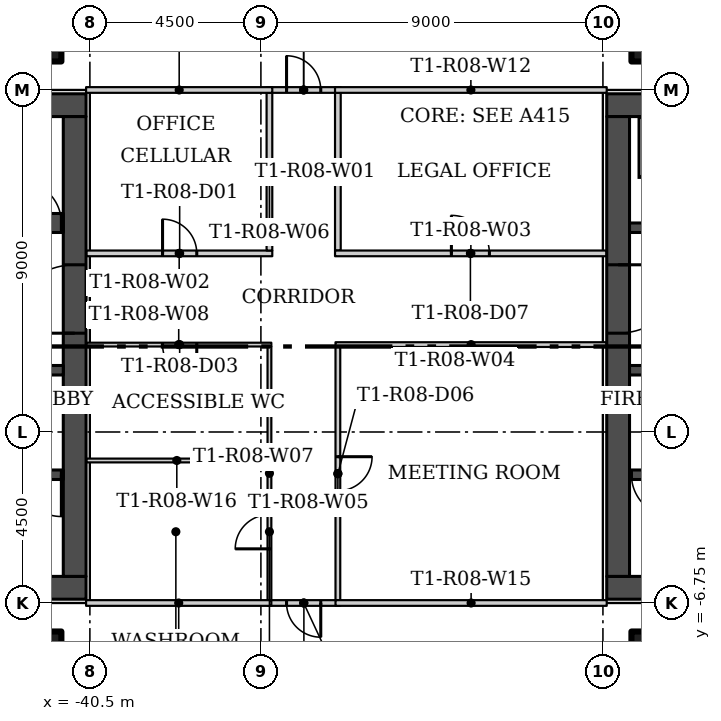
"""IFC4 building model, lengths in metres.
Left out: names, types, materials, properties, quantities, classifications, styles, units other than length and angle.
Written with IfcOpenShell. Run it as: python <this file> out.ifc"""

import sys

from ifc_helpers import new_model, si_unit, direction, frame, frame_2d, origin, origin_2d, place, context, subcontext, project, spatial, rectangle, hollow_rectangle, extrude, element, fill, save


model = new_model("IFC4")
c1 = context("Model", 3, precision=1e-05, world=origin(), true_north=direction((0.0, 1.0)))
c2 = subcontext(c1, "Body", "Model", "MODEL_VIEW")
j1 = project(units=[si_unit("LENGTHUNIT", "METRE"), si_unit("PLANEANGLEUNIT", "RADIAN")], contexts=[c1])
p1 = place(None, origin())
s1 = spatial("IfcSite", under=j1, at=p1, CompositionType="ELEMENT")
p2 = place(p1, origin())
s2 = spatial("IfcBuilding", under=s1, at=p2, CompositionType="ELEMENT")
p3 = place(p2, frame((0.0, 0.0, 81.9)))
s3 = spatial("IfcBuildingStorey", under=s2, at=p3, CompositionType="ELEMENT", Elevation=81.9)
for number, where in (
    (1, (-25.625, 8.125, 0.0)),
    (2, (-25.625, -8.125, 0.0)),
    (3, (-41.875, 8.125, 0.0)),
    (4, (-41.875, -8.125, 0.0)),
):
    element("IfcColumn", number, at=place(p3, frame(where)), inside=s3, PredefinedType="COLUMN", context=c2, shape_type="SweptSolid", body=[
        extrude(hollow_rectangle(XDim=1.25, YDim=1.25, WallThickness=0.05, at=origin_2d()), origin(), (0.0, 0.0, 1.0), 3.55),
    ])
p4 = place(p3, frame((-33.975, 6.675, 0.0), z_axis=(0.0, 0.0, 1.0), x_axis=(0.0, -1.0, 0.0)))
e5 = element("IfcWall", 5, at=p4, inside=s3, PredefinedType="PARTITIONING", context=c2, shape_type="SweptSolid", body=[
    extrude(rectangle(XDim=4.15, YDim=0.15, at=frame_2d((2.075, 0.0))), origin(), (0.0, 0.0, 1.0), 3.55),
])
p5 = place(p3, frame((-40.6, 2.45, 0.0)))
e6 = element("IfcWall", 6, at=p5, inside=s3, PredefinedType="PARTITIONING", context=c2, shape_type="SweptSolid", body=[
    extrude(rectangle(XDim=4.9, YDim=0.15, at=frame_2d((2.45, 0.0))), origin(), (0.0, 0.0, 1.0), 3.55),
])
p6 = place(p5, frame((2.012, 0.0, 0.0)))
e7 = element("IfcOpeningElement", 7, at=p6, cuts=e6, PredefinedType="OPENING", context=c2, shape_type="SweptSolid", body=[
    extrude(rectangle(XDim=0.9, YDim=2.1, at=frame_2d((0.45, 1.05))), frame((0.0, 0.085, 0.0), z_axis=(0.0, -1.0, 0.0), x_axis=(1.0, 0.0, 0.0)), (0.0, 0.0, 1.0), 0.17),
])
p7 = place(p3, frame((-34.05, 2.45, 0.0)))
e8 = element("IfcWall", 8, at=p7, inside=s3, PredefinedType="PARTITIONING", context=c2, shape_type="SweptSolid", body=[
    extrude(rectangle(XDim=7.15, YDim=0.15, at=frame_2d((3.575, 0.0))), origin(), (0.0, 0.0, 1.0), 3.55),
])
p8 = place(p7, frame((3.062, 0.0, 0.0)))
e9 = element("IfcOpeningElement", 9, at=p8, cuts=e8, PredefinedType="OPENING", context=c2, shape_type="SweptSolid", body=[
    extrude(rectangle(XDim=1.0, YDim=2.4, at=frame_2d((0.5, 1.2))), frame((0.0, 0.085, 0.0), z_axis=(0.0, -1.0, 0.0), x_axis=(1.0, 0.0, 0.0)), (0.0, 0.0, 1.0), 0.17),
])
p9 = place(p3, frame((-26.9, 0.05, 0.0), z_axis=(0.0, 0.0, 1.0), x_axis=(-1.0, 0.0, 0.0)))
e10 = element("IfcWall", 10, at=p9, inside=s3, PredefinedType="PARTITIONING", context=c2, shape_type="SweptSolid", body=[
    extrude(rectangle(XDim=7.137, YDim=0.125, at=frame_2d((3.569, 0.0))), origin(), (0.0, 0.0, 1.0), 3.55),
])
p10 = place(p3, frame((-33.975, -0.013, 0.0), z_axis=(0.0, 0.0, 1.0), x_axis=(0.0, -1.0, 0.0)))
e11 = element("IfcWall", 11, at=p10, inside=s3, PredefinedType="PARTITIONING", context=c2, shape_type="SweptSolid", body=[
    extrude(rectangle(XDim=6.662, YDim=0.125, at=frame_2d((3.331, 0.0))), origin(), (0.0, 0.0, 1.0), 3.55),
])
p11 = place(p10, frame((2.887, 0.0, 0.0)))
e12 = element("IfcOpeningElement", 12, at=p11, cuts=e11, PredefinedType="OPENING", context=c2, shape_type="SweptSolid", body=[
    extrude(rectangle(XDim=0.9, YDim=2.1, at=frame_2d((0.45, 1.05))), frame((0.0, 0.073, 0.0), z_axis=(0.0, -1.0, 0.0), x_axis=(1.0, 0.0, 0.0)), (0.0, 0.0, 1.0), 0.145),
])
p12 = place(p3, frame((-35.775, 2.525, 0.0), z_axis=(0.0, 0.0, 1.0), x_axis=(0.0, 1.0, 0.0)))
e13 = element("IfcWall", 13, at=p12, inside=s3, PredefinedType="PARTITIONING", context=c2, shape_type="SweptSolid", body=[
    extrude(rectangle(XDim=4.15, YDim=0.15, at=frame_2d((2.075, 0.0))), origin(), (0.0, 0.0, 1.0), 3.55),
])
p13 = place(p3, frame((-35.775, -6.675, 0.0), z_axis=(0.0, 0.0, 1.0), x_axis=(0.0, 1.0, 0.0)))
e14 = element("IfcWall", 14, at=p13, inside=s3, PredefinedType="PARTITIONING", context=c2, shape_type="SweptSolid", body=[
    extrude(rectangle(XDim=6.675, YDim=0.1, at=frame_2d((3.337, 0.0))), origin(), (0.0, 0.0, 1.0), 3.55),
])
p14 = place(p13, frame((1.35, 0.0, 0.0)))
e15 = element("IfcOpeningElement", 15, at=p14, cuts=e14, PredefinedType="OPENING", context=c2, shape_type="SweptSolid", body=[
    extrude(rectangle(XDim=0.9, YDim=2.1, at=frame_2d((0.45, 1.05))), frame((0.0, 0.06, 0.0), z_axis=(0.0, -1.0, 0.0), x_axis=(1.0, 0.0, 0.0)), (0.0, 0.0, 1.0), 0.12),
])
p15 = place(p3, frame((-35.725, 0.05, 0.0), z_axis=(0.0, 0.0, 1.0), x_axis=(-1.0, 0.0, 0.0)))
e16 = element("IfcWall", 16, at=p15, inside=s3, PredefinedType="PARTITIONING", context=c2, shape_type="SweptSolid", body=[
    extrude(rectangle(XDim=4.875, YDim=0.1, at=frame_2d((2.438, 0.0))), origin(), (0.0, 0.0, 1.0), 3.55),
])
p16 = place(p15, frame((1.962, 0.0, 0.0)))
e17 = element("IfcOpeningElement", 17, at=p16, cuts=e16, PredefinedType="OPENING", context=c2, shape_type="SweptSolid", body=[
    extrude(rectangle(XDim=0.9, YDim=2.1, at=frame_2d((0.45, 1.05))), frame((0.0, 0.06, 0.0), z_axis=(0.0, -1.0, 0.0), x_axis=(1.0, 0.0, 0.0)), (0.0, 0.0, 1.0), 0.12),
])
p17 = place(p3, frame((-35.85, 6.75, 0.0)))
e18 = element("IfcWall", 18, at=p17, inside=s3, PredefinedType="PARTITIONING", context=c2, shape_type="SweptSolid", body=[
    extrude(rectangle(XDim=1.951, YDim=0.15, at=frame_2d((0.975, 0.0))), origin(), (0.0, 0.0, 1.0), 3.55),
])
p18 = place(p17, frame((0.525, 0.0, 0.0)))
e19 = element("IfcOpeningElement", 19, at=p18, cuts=e18, PredefinedType="OPENING", context=c2, shape_type="SweptSolid", body=[
    extrude(rectangle(XDim=0.9, YDim=2.1, at=frame_2d((0.45, 1.05))), frame((0.0, 0.085, 0.0), z_axis=(0.0, -1.0, 0.0), x_axis=(1.0, 0.0, 0.0)), (0.0, 0.0, 1.0), 0.17),
])
p19 = place(p3, frame((-33.912, -6.75, 0.0), z_axis=(0.0, 0.0, 1.0), x_axis=(-1.0, 0.0, 0.0)))
e20 = element("IfcWall", 20, at=p19, inside=s3, PredefinedType="PARTITIONING", context=c2, shape_type="SweptSolid", body=[
    extrude(rectangle(XDim=1.913, YDim=0.15, at=frame_2d((0.957, 0.0))), origin(), (0.0, 0.0, 1.0), 3.55),
])
p20 = place(p19, frame((0.513, 0.0, 0.0)))
e21 = element("IfcOpeningElement", 21, at=p20, cuts=e20, PredefinedType="OPENING", context=c2, shape_type="SweptSolid", body=[
    extrude(rectangle(XDim=0.9, YDim=2.1, at=frame_2d((0.45, 1.05))), frame((0.0, 0.085, 0.0), z_axis=(0.0, -1.0, 0.0), x_axis=(1.0, 0.0, 0.0)), (0.0, 0.0, 1.0), 0.17),
])
p21 = place(p3, frame((-26.9, 6.75, 0.0), z_axis=(0.0, 0.0, 1.0), x_axis=(-1.0, 0.0, 0.0)))
e22 = element("IfcWall", 22, at=p21, inside=s3, PredefinedType="PARTITIONING", context=c2, shape_type="SweptSolid", body=[
    extrude(rectangle(XDim=7.15, YDim=0.15, at=frame_2d((3.575, 0.0))), origin(), (0.0, 0.0, 1.0), 3.55),
])
p22 = place(p3, frame((-35.7, 6.75, 0.0), z_axis=(0.0, 0.0, 1.0), x_axis=(-1.0, 0.0, 0.0)))
e23 = element("IfcWall", 23, at=p22, inside=s3, PredefinedType="PARTITIONING", context=c2, shape_type="SweptSolid", body=[
    extrude(rectangle(XDim=4.9, YDim=0.15, at=frame_2d((2.45, 0.0))), origin(), (0.0, 0.0, 1.0), 3.55),
])
p23 = place(p3, frame((-40.6, -6.75, 0.0)))
e24 = element("IfcWall", 24, at=p23, inside=s3, PredefinedType="PARTITIONING", context=c2, shape_type="SweptSolid", body=[
    extrude(rectangle(XDim=4.875, YDim=0.15, at=frame_2d((2.438, 0.0))), origin(), (0.0, 0.0, 1.0), 3.55),
])
p24 = place(p3, frame((-34.037, -6.75, 0.0)))
e25 = element("IfcWall", 25, at=p24, inside=s3, PredefinedType="PARTITIONING", context=c2, shape_type="SweptSolid", body=[
    extrude(rectangle(XDim=7.137, YDim=0.15, at=frame_2d((3.569, 0.0))), origin(), (0.0, 0.0, 1.0), 3.55),
])
p25 = place(p3, frame((-35.825, -3.0, 0.0), z_axis=(0.0, 0.0, 1.0), x_axis=(-1.0, 0.0, 0.0)))
e26 = element("IfcWall", 26, at=p25, inside=s3, PredefinedType="PARTITIONING", context=c2, shape_type="SweptSolid", body=[
    extrude(rectangle(XDim=4.775, YDim=0.1, at=frame_2d((2.387, 0.0))), origin(), (0.0, 0.0, 1.0), 3.55),
])
for number, where in (
    (27, (-26.9, -6.35, 0.0)),
    (28, (-26.9, 6.35, 0.0)),
):
    element("IfcWall", number, at=place(p3, frame(where)), inside=s3, PredefinedType="SHEAR", context=c2, shape_type="SweptSolid", body=[
        extrude(rectangle(XDim=13.3, YDim=0.6, at=frame_2d((6.65, 0.0))), origin(), (0.0, 0.0, 1.0), 3.55),
    ])
p26 = place(p3, frame((-26.6, 6.05, 0.0), z_axis=(0.0, 0.0, 1.0), x_axis=(0.0, -1.0, 0.0)))
e29 = element("IfcWall", 29, at=p26, inside=s3, PredefinedType="SHEAR", context=c2, shape_type="SweptSolid", body=[
    extrude(rectangle(XDim=12.1, YDim=0.6, at=frame_2d((6.05, 0.0))), origin(), (0.0, 0.0, 1.0), 3.55),
])
p27 = place(p26, frame((3.9, 0.0, 0.0)))
e30 = element("IfcOpeningElement", 30, at=p27, cuts=e29, PredefinedType="OPENING", context=c2, shape_type="SweptSolid", body=[
    extrude(rectangle(XDim=1.8, YDim=2.4, at=frame_2d((0.9, 1.2))), frame((0.0, 0.31, 0.0), z_axis=(0.0, -1.0, 0.0), x_axis=(1.0, 0.0, 0.0)), (0.0, 0.0, 1.0), 0.62),
])
p28 = place(p3, frame((-14.2, -3.375, 0.0), z_axis=(0.0, 0.0, 1.0), x_axis=(-1.0, 0.0, 0.0)))
e31 = element("IfcWall", 31, at=p28, inside=s3, PredefinedType="SHEAR", context=c2, shape_type="SweptSolid", body=[
    extrude(rectangle(XDim=12.1, YDim=0.25, at=frame_2d((6.05, 0.0))), origin(), (0.0, 0.0, 1.0), 3.55),
])
p29 = place(p28, frame((10.95, 0.0, 0.0)))
e32 = element("IfcOpeningElement", 32, at=p29, cuts=e31, PredefinedType="OPENING", context=c2, shape_type="SweptSolid", body=[
    extrude(rectangle(XDim=1.1, YDim=2.1, at=frame_2d((0.55, 1.05))), frame((0.0, 0.135, 0.0), z_axis=(0.0, -1.0, 0.0), x_axis=(1.0, 0.0, 0.0)), (0.0, 0.0, 1.0), 0.27),
])
p30 = place(p3, frame((-14.2, -0.625, 0.0), z_axis=(0.0, 0.0, 1.0), x_axis=(-1.0, 0.0, 0.0)))
e33 = element("IfcWall", 33, at=p30, inside=s3, PredefinedType="SHEAR", context=c2, shape_type="SweptSolid", body=[
    extrude(rectangle(XDim=12.1, YDim=0.25, at=frame_2d((6.05, 0.0))), origin(), (0.0, 0.0, 1.0), 3.55),
])
p31 = place(p30, frame((8.65, 0.0, 0.0)))
e34 = element("IfcOpeningElement", 34, at=p31, cuts=e33, PredefinedType="OPENING", context=c2, shape_type="SweptSolid", body=[
    extrude(rectangle(XDim=1.2, YDim=2.1, at=frame_2d((0.6, 1.05))), frame((0.0, 0.135, 0.0), z_axis=(0.0, -1.0, 0.0), x_axis=(1.0, 0.0, 0.0)), (0.0, 0.0, 1.0), 0.27),
])
p32 = place(p30, frame((2.0, 0.0, 0.0)))
e35 = element("IfcOpeningElement", 35, at=p32, cuts=e33, PredefinedType="OPENING", context=c2, shape_type="SweptSolid", body=[
    extrude(rectangle(XDim=0.9, YDim=2.1, at=frame_2d((0.45, 1.05))), frame((0.0, 0.135, 0.0), z_axis=(0.0, -1.0, 0.0), x_axis=(1.0, 0.0, 0.0)), (0.0, 0.0, 1.0), 0.27),
])
p33 = place(p30, frame((0.375, 0.0, 0.0)))
e36 = element("IfcOpeningElement", 36, at=p33, cuts=e33, PredefinedType="OPENING", context=c2, shape_type="SweptSolid", body=[
    extrude(rectangle(XDim=0.9, YDim=2.1, at=frame_2d((0.45, 1.05))), frame((0.0, 0.135, 0.0), z_axis=(0.0, -1.0, 0.0), x_axis=(1.0, 0.0, 0.0)), (0.0, 0.0, 1.0), 0.27),
])
p34 = place(p3, frame((-26.3, 3.125, 0.0)))
e37 = element("IfcWall", 37, at=p34, inside=s3, PredefinedType="SHEAR", context=c2, shape_type="SweptSolid", body=[
    extrude(rectangle(XDim=12.1, YDim=0.25, at=frame_2d((6.05, 0.0))), origin(), (0.0, 0.0, 1.0), 3.55),
])
p35 = place(p34, frame((0.85, 0.0, 0.0)))
e38 = element("IfcOpeningElement", 38, at=p35, cuts=e37, PredefinedType="OPENING", context=c2, shape_type="SweptSolid", body=[
    extrude(rectangle(XDim=1.1, YDim=2.1, at=frame_2d((0.55, 1.05))), frame((0.0, 0.135, 0.0), z_axis=(0.0, -1.0, 0.0), x_axis=(1.0, 0.0, 0.0)), (0.0, 0.0, 1.0), 0.27),
])
p36 = place(p34, frame((3.9, 0.0, 0.0)))
e39 = element("IfcOpeningElement", 39, at=p36, cuts=e37, PredefinedType="OPENING", context=c2, shape_type="SweptSolid", body=[
    extrude(rectangle(XDim=1.1, YDim=2.1, at=frame_2d((0.55, 1.05))), frame((0.0, 0.135, 0.0), z_axis=(0.0, -1.0, 0.0), x_axis=(1.0, 0.0, 0.0)), (0.0, 0.0, 1.0), 0.27),
])
for number, where, z_axis, x_axis in (
    (40, (-40.6, -6.35, 0.0), (0.0, 0.0, 1.0), (-1.0, 0.0, 0.0)),
    (41, (-40.6, 6.35, 0.0), (0.0, 0.0, 1.0), (-1.0, 0.0, 0.0)),
):
    element("IfcWall", number, at=place(p3, frame(where, z_axis=z_axis, x_axis=x_axis)), inside=s3, PredefinedType="SHEAR", context=c2, shape_type="SweptSolid", body=[
        extrude(rectangle(XDim=13.3, YDim=0.6, at=frame_2d((6.65, 0.0))), origin(), (0.0, 0.0, 1.0), 3.55),
    ])
p37 = place(p3, frame((-40.9, -6.05, 0.0), z_axis=(0.0, 0.0, 1.0), x_axis=(0.0, 1.0, 0.0)))
e42 = element("IfcWall", 42, at=p37, inside=s3, PredefinedType="SHEAR", context=c2, shape_type="SweptSolid", body=[
    extrude(rectangle(XDim=12.1, YDim=0.6, at=frame_2d((6.05, 0.0))), origin(), (0.0, 0.0, 1.0), 3.55),
])
p38 = place(p37, frame((6.4, 0.0, 0.0)))
e43 = element("IfcOpeningElement", 43, at=p38, cuts=e42, PredefinedType="OPENING", context=c2, shape_type="SweptSolid", body=[
    extrude(rectangle(XDim=1.8, YDim=2.4, at=frame_2d((0.9, 1.2))), frame((0.0, 0.31, 0.0), z_axis=(0.0, -1.0, 0.0), x_axis=(1.0, 0.0, 0.0)), (0.0, 0.0, 1.0), 0.62),
])
p39 = place(p3, frame((-41.2, -3.375, 0.0), z_axis=(0.0, 0.0, 1.0), x_axis=(-1.0, 0.0, 0.0)))
e44 = element("IfcWall", 44, at=p39, inside=s3, PredefinedType="SHEAR", context=c2, shape_type="SweptSolid", body=[
    extrude(rectangle(XDim=12.1, YDim=0.25, at=frame_2d((6.05, 0.0))), origin(), (0.0, 0.0, 1.0), 3.55),
])
p40 = place(p39, frame((0.05, 0.0, 0.0)))
e45 = element("IfcOpeningElement", 45, at=p40, cuts=e44, PredefinedType="OPENING", context=c2, shape_type="SweptSolid", body=[
    extrude(rectangle(XDim=1.1, YDim=2.1, at=frame_2d((0.55, 1.05))), frame((0.0, 0.135, 0.0), z_axis=(0.0, -1.0, 0.0), x_axis=(1.0, 0.0, 0.0)), (0.0, 0.0, 1.0), 0.27),
])
p41 = place(p3, frame((-41.2, -0.625, 0.0), z_axis=(0.0, 0.0, 1.0), x_axis=(-1.0, 0.0, 0.0)))
e46 = element("IfcWall", 46, at=p41, inside=s3, PredefinedType="SHEAR", context=c2, shape_type="SweptSolid", body=[
    extrude(rectangle(XDim=12.1, YDim=0.25, at=frame_2d((6.05, 0.0))), origin(), (0.0, 0.0, 1.0), 3.55),
])
p42 = place(p41, frame((2.25, 0.0, 0.0)))
e47 = element("IfcOpeningElement", 47, at=p42, cuts=e46, PredefinedType="OPENING", context=c2, shape_type="SweptSolid", body=[
    extrude(rectangle(XDim=1.2, YDim=2.1, at=frame_2d((0.6, 1.05))), frame((0.0, 0.135, 0.0), z_axis=(0.0, -1.0, 0.0), x_axis=(1.0, 0.0, 0.0)), (0.0, 0.0, 1.0), 0.27),
])
p43 = place(p41, frame((9.05, 0.0, 0.0)))
e48 = element("IfcOpeningElement", 48, at=p43, cuts=e46, PredefinedType="OPENING", context=c2, shape_type="SweptSolid", body=[
    extrude(rectangle(XDim=0.9, YDim=2.1, at=frame_2d((0.45, 1.05))), frame((0.0, 0.135, 0.0), z_axis=(0.0, -1.0, 0.0), x_axis=(1.0, 0.0, 0.0)), (0.0, 0.0, 1.0), 0.27),
])
p44 = place(p41, frame((10.675, 0.0, 0.0)))
e49 = element("IfcOpeningElement", 49, at=p44, cuts=e46, PredefinedType="OPENING", context=c2, shape_type="SweptSolid", body=[
    extrude(rectangle(XDim=0.9, YDim=2.1, at=frame_2d((0.45, 1.05))), frame((0.0, 0.135, 0.0), z_axis=(0.0, -1.0, 0.0), x_axis=(1.0, 0.0, 0.0)), (0.0, 0.0, 1.0), 0.27),
])
p45 = place(p3, frame((-48.5, 3.25, 0.0)))
e50 = element("IfcWall", 50, at=p45, inside=s3, PredefinedType="SHEAR", context=c2, shape_type="SweptSolid", body=[
    extrude(rectangle(XDim=7.3, YDim=0.5, at=frame_2d((3.65, 0.0))), origin(), (0.0, 0.0, 1.0), 3.55),
])
p46 = place(p45, frame((6.15, 0.0, 0.0)))
e51 = element("IfcOpeningElement", 51, at=p46, cuts=e50, PredefinedType="OPENING", context=c2, shape_type="SweptSolid", body=[
    extrude(rectangle(XDim=1.1, YDim=2.1, at=frame_2d((0.55, 1.05))), frame((0.0, 0.26, 0.0), z_axis=(0.0, -1.0, 0.0), x_axis=(1.0, 0.0, 0.0)), (0.0, 0.0, 1.0), 0.52),
])
p47 = place(p6, origin())
e52 = element("IfcDoor", 52, at=p47, inside=s3, OperationType="SINGLE_SWING_LEFT", PredefinedType="DOOR", context=c2, shape_type="SweptSolid", body=[
    extrude(rectangle(XDim=0.9, YDim=2.1, at=frame_2d((0.45, 1.05))), frame((0.0, 0.025, 0.0), z_axis=(0.0, -1.0, 0.0), x_axis=(1.0, 0.0, 0.0)), (0.0, 0.0, 1.0), 0.05),
])
fill(e7, e52)
p48 = place(p14, origin())
e53 = element("IfcDoor", 53, at=p48, inside=s3, OperationType="SINGLE_SWING_RIGHT", PredefinedType="DOOR", context=c2, shape_type="SweptSolid", body=[
    extrude(rectangle(XDim=0.9, YDim=2.1, at=frame_2d((0.45, 1.05))), frame((0.0, 0.025, 0.0), z_axis=(0.0, -1.0, 0.0), x_axis=(1.0, 0.0, 0.0)), (0.0, 0.0, 1.0), 0.05),
])
fill(e15, e53)
p49 = place(p16, origin())
e54 = element("IfcDoor", 54, at=p49, inside=s3, OperationType="SINGLE_SWING_RIGHT", PredefinedType="DOOR", context=c2, shape_type="SweptSolid", body=[
    extrude(rectangle(XDim=0.9, YDim=2.1, at=frame_2d((0.45, 1.05))), frame((0.0, 0.025, 0.0), z_axis=(0.0, -1.0, 0.0), x_axis=(1.0, 0.0, 0.0)), (0.0, 0.0, 1.0), 0.05),
])
fill(e17, e54)
p50 = place(p18, origin())
e55 = element("IfcDoor", 55, at=p50, inside=s3, OperationType="SINGLE_SWING_LEFT", PredefinedType="DOOR", context=c2, shape_type="SweptSolid", body=[
    extrude(rectangle(XDim=0.9, YDim=2.1, at=frame_2d((0.45, 1.05))), frame((0.0, 0.025, 0.0), z_axis=(0.0, -1.0, 0.0), x_axis=(1.0, 0.0, 0.0)), (0.0, 0.0, 1.0), 0.05),
])
fill(e19, e55)
p51 = place(p20, origin())
e56 = element("IfcDoor", 56, at=p51, inside=s3, OperationType="SINGLE_SWING_RIGHT", PredefinedType="DOOR", context=c2, shape_type="SweptSolid", body=[
    extrude(rectangle(XDim=0.9, YDim=2.1, at=frame_2d((0.45, 1.05))), frame((0.0, 0.025, 0.0), z_axis=(0.0, -1.0, 0.0), x_axis=(1.0, 0.0, 0.0)), (0.0, 0.0, 1.0), 0.05),
])
fill(e21, e56)
p52 = place(p11, origin())
e57 = element("IfcDoor", 57, at=p52, inside=s3, OperationType="SINGLE_SWING_RIGHT", PredefinedType="DOOR", context=c2, shape_type="SweptSolid", body=[
    extrude(rectangle(XDim=0.9, YDim=2.1, at=frame_2d((0.45, 1.05))), frame((0.0, 0.025, 0.0), z_axis=(0.0, -1.0, 0.0), x_axis=(1.0, 0.0, 0.0)), (0.0, 0.0, 1.0), 0.05),
])
fill(e12, e57)
p53 = place(p8, origin())
e58 = element("IfcDoor", 58, at=p53, inside=s3, OperationType="SINGLE_SWING_RIGHT", PredefinedType="DOOR", context=c2, shape_type="SweptSolid", body=[
    extrude(rectangle(XDim=1.0, YDim=2.4, at=frame_2d((0.5, 1.2))), frame((0.0, 0.025, 0.0), z_axis=(0.0, -1.0, 0.0), x_axis=(1.0, 0.0, 0.0)), (0.0, 0.0, 1.0), 0.05),
])
fill(e9, e58)
p54 = place(p27, origin())
e59 = element("IfcDoor", 59, at=p54, inside=s3, OperationType="DOUBLE_DOOR_SINGLE_SWING", PredefinedType="DOOR", context=c2, shape_type="SweptSolid", body=[
    extrude(rectangle(XDim=1.8, YDim=2.4, at=frame_2d((0.9, 1.2))), frame((0.0, 0.025, 0.0), z_axis=(0.0, -1.0, 0.0), x_axis=(1.0, 0.0, 0.0)), (0.0, 0.0, 1.0), 0.05),
])
fill(e30, e59)
p55 = place(p29, origin())
e60 = element("IfcDoor", 60, at=p55, inside=s3, OperationType="SINGLE_SWING_RIGHT", PredefinedType="DOOR", context=c2, shape_type="SweptSolid", body=[
    extrude(rectangle(XDim=1.1, YDim=2.1, at=frame_2d((0.55, 1.05))), frame((0.0, 0.025, 0.0), z_axis=(0.0, -1.0, 0.0), x_axis=(1.0, 0.0, 0.0)), (0.0, 0.0, 1.0), 0.05),
])
fill(e32, e60)
p56 = place(p38, origin())
e61 = element("IfcDoor", 61, at=p56, inside=s3, OperationType="DOUBLE_DOOR_SINGLE_SWING", PredefinedType="DOOR", context=c2, shape_type="SweptSolid", body=[
    extrude(rectangle(XDim=1.8, YDim=2.4, at=frame_2d((0.9, 1.2))), frame((0.0, 0.025, 0.0), z_axis=(0.0, -1.0, 0.0), x_axis=(1.0, 0.0, 0.0)), (0.0, 0.0, 1.0), 0.05),
])
fill(e43, e61)
p57 = place(p40, origin())
e62 = element("IfcDoor", 62, at=p57, inside=s3, OperationType="SINGLE_SWING_LEFT", PredefinedType="DOOR", context=c2, shape_type="SweptSolid", body=[
    extrude(rectangle(XDim=1.1, YDim=2.1, at=frame_2d((0.55, 1.05))), frame((0.0, 0.025, 0.0), z_axis=(0.0, -1.0, 0.0), x_axis=(1.0, 0.0, 0.0)), (0.0, 0.0, 1.0), 0.05),
])
fill(e45, e62)
p58 = place(p46, origin())
e63 = element("IfcDoor", 63, at=p58, inside=s3, OperationType="SINGLE_SWING_RIGHT", PredefinedType="DOOR", context=c2, shape_type="SweptSolid", body=[
    extrude(rectangle(XDim=1.1, YDim=2.1, at=frame_2d((0.55, 1.05))), frame((0.0, 0.025, 0.0), z_axis=(0.0, -1.0, 0.0), x_axis=(1.0, 0.0, 0.0)), (0.0, 0.0, 1.0), 0.05),
])
fill(e51, e63)
save(model, sys.argv[1])
